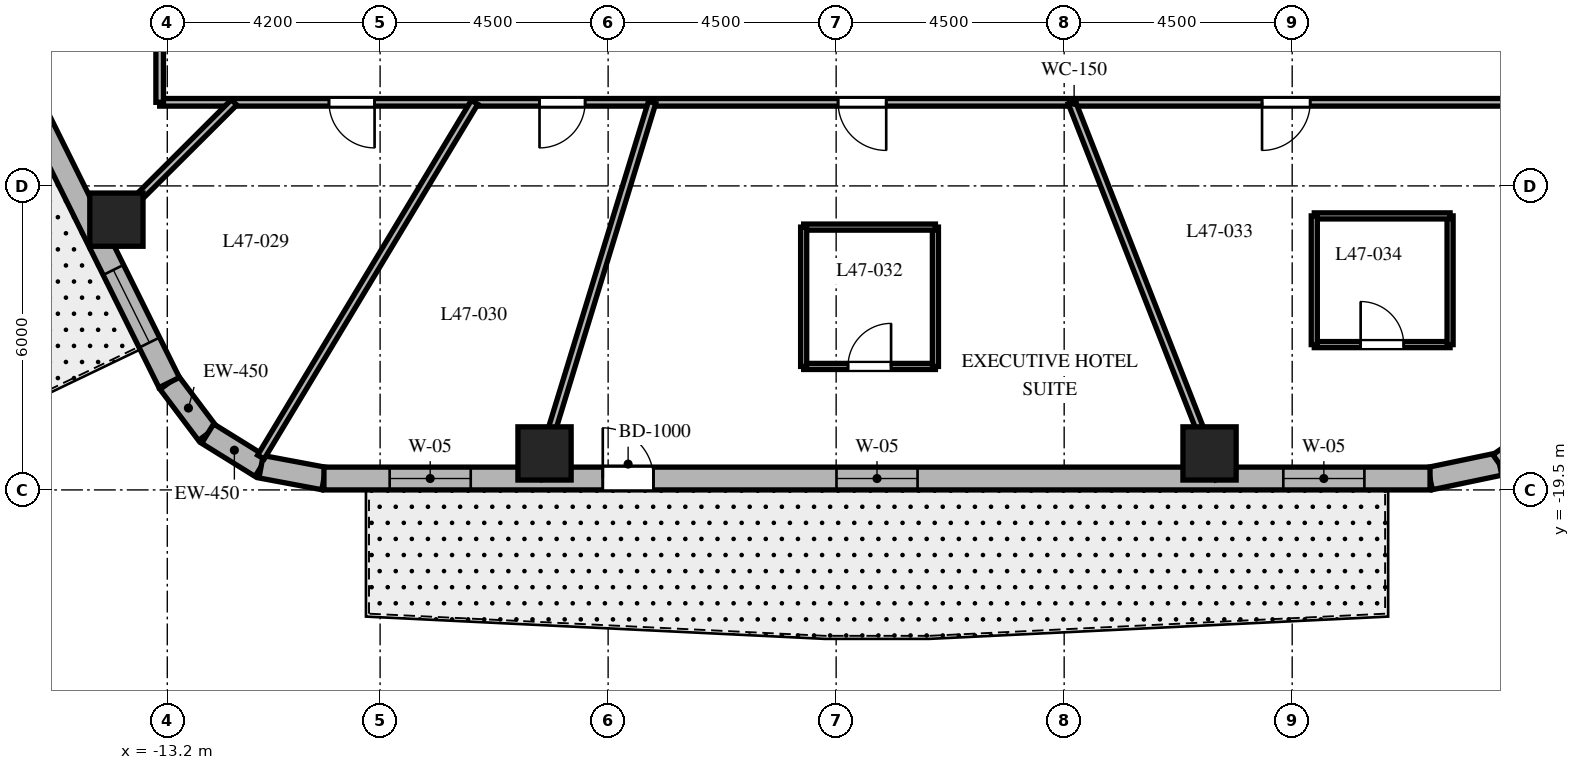
"""IFC4 building model, lengths in metres.
Left out: names, types, materials, properties, quantities, classifications, styles, units other than length and angle.
Written with IfcOpenShell. Run it as: python <this file> out.ifc"""

import sys

from ifc_helpers import new_model, si_unit, direction, frame, frame_2d, origin, origin_2d, place, context, subcontext, project, spatial, rectangle, extrude, element, fill, save


model = new_model("IFC4")
c1 = context("Model", 3, precision=1e-05, world=origin(), true_north=direction((0.0, 1.0)))
c2 = subcontext(c1, "Body", "Model", "MODEL_VIEW")
j1 = project(units=[si_unit("LENGTHUNIT", "METRE"), si_unit("PLANEANGLEUNIT", "RADIAN")], contexts=[c1])
p1 = place(None, origin())
s1 = spatial("IfcSite", under=j1, at=p1, CompositionType="ELEMENT")
p2 = place(p1, origin())
s2 = spatial("IfcBuilding", under=s1, at=p2, CompositionType="ELEMENT")
p3 = place(p2, frame((0.0, 0.0, 190.4)))
s3 = spatial("IfcBuildingStorey", under=s2, at=p3, CompositionType="ELEMENT", Elevation=190.4)
for number, where, z_axis, x_axis in (
    (1, (-5.755, -18.78, 0.0), (0.0, 0.0, 1.0), (1.0, 0.0, 0.0)),
    (2, (7.369, -18.78, 0.0), (0.0, 0.0, 1.0), (1.0, 0.0, 0.0)),
    (3, (-14.204, -14.166, 0.0), (0.0, 0.0, 1.0), (1.0, 0.0, 0.0)),
):
    element("IfcColumn", number, at=place(p3, frame(where, z_axis=z_axis, x_axis=x_axis)), inside=s3, PredefinedType="COLUMN", context=c2, shape_type="SweptSolid", body=[
        extrude(rectangle(XDim=1.05, YDim=1.05, at=origin_2d()), origin(), (0.0, 0.0, 1.0), 3.7),
    ])
p4 = place(p3, frame((-13.162, -17.381, 0.0), z_axis=(0.0, 0.0, 1.0), x_axis=(0.601515770517, -0.798860925205, 0.0)))
e4 = element("IfcWall", 4, at=p4, inside=s3, PredefinedType="SOLIDWALL", context=c2, shape_type="SweptSolid", body=[
    extrude(rectangle(XDim=1.262, YDim=0.45, at=frame_2d((0.631, 0.0))), origin(), (0.0, 0.0, 1.0), 3.4),
])
p5 = place(p3, frame((-12.403, -18.389, 0.0), z_axis=(0.0, 0.0, 1.0), x_axis=(0.849795170926, -0.527113049991, 0.0)))
e5 = element("IfcWall", 5, at=p5, inside=s3, PredefinedType="SOLIDWALL", context=c2, shape_type="SweptSolid", body=[
    extrude(rectangle(XDim=1.241, YDim=0.45, at=frame_2d((0.62, 0.0))), origin(), (0.0, 0.0, 1.0), 3.4),
])
p6 = place(p3, frame((-11.349, -19.043, 0.0), z_axis=(0.0, 0.0, 1.0), x_axis=(0.982931267051, -0.183973161772, 0.0)))
e6 = element("IfcWall", 6, at=p6, inside=s3, PredefinedType="SOLIDWALL", context=c2, shape_type="SweptSolid", body=[
    extrude(rectangle(XDim=1.262, YDim=0.45, at=frame_2d((0.631, 0.0))), origin(), (0.0, 0.0, 1.0), 3.4),
])
p7 = place(p3, frame((11.72, -19.275, 0.0), z_axis=(0.0, 0.0, 1.0), x_axis=(0.97893106758, 0.204191001093, 0.0)))
e7 = element("IfcWall", 7, at=p7, inside=s3, PredefinedType="SOLIDWALL", context=c2, shape_type="SweptSolid", body=[
    extrude(rectangle(XDim=1.4, YDim=0.45, at=frame_2d((0.7, 0.0))), origin(), (0.0, 0.0, 1.0), 3.4),
])
p8 = place(p3, frame((13.091, -18.989, 0.0), z_axis=(0.0, 0.0, 1.0), x_axis=(0.815574637848, 0.578651890258, 0.0)))
e8 = element("IfcWall", 8, at=p8, inside=s3, PredefinedType="SOLIDWALL", context=c2, shape_type="SweptSolid", body=[
    extrude(rectangle(XDim=1.377, YDim=0.45, at=frame_2d((0.688, 0.0))), origin(), (0.0, 0.0, 1.0), 3.4),
])
p9 = place(p3, frame((-10.108, -19.275, 0.0), z_axis=(0.0, 0.0, 1.0), x_axis=(1.0, 0.0, 0.0)))
e9 = element("IfcWall", 9, at=p9, inside=s3, PredefinedType="SOLIDWALL", context=c2, shape_type="SweptSolid", body=[
    extrude(rectangle(XDim=21.829, YDim=0.45, at=frame_2d((10.915, 0.0))), origin(), (0.0, 0.0, 1.0), 3.4),
])
p10 = place(p9, frame((5.503, 0.0, 0.0)))
e10 = element("IfcOpeningElement", 10, at=p10, cuts=e9, PredefinedType="OPENING", context=c2, shape_type="SweptSolid", body=[
    extrude(rectangle(XDim=1.0, YDim=2.15, at=frame_2d((0.5, 1.075))), frame((0.0, 0.235, 0.0), z_axis=(0.0, -1.0, 0.0), x_axis=(1.0, 0.0, 0.0)), (0.0, 0.0, 1.0), 0.47),
])
p11 = place(p9, frame((1.297, 0.0, 0.8)))
e11 = element("IfcOpeningElement", 11, at=p11, cuts=e9, PredefinedType="OPENING", context=c2, shape_type="SweptSolid", body=[
    extrude(rectangle(XDim=1.6, YDim=1.75, at=frame_2d((0.8, 0.875))), frame((0.0, 0.235, 0.0), z_axis=(0.0, -1.0, 0.0), x_axis=(1.0, 0.0, 0.0)), (0.0, 0.0, 1.0), 0.47),
])
p12 = place(p9, frame((10.115, 0.0, 0.8)))
e12 = element("IfcOpeningElement", 12, at=p12, cuts=e9, PredefinedType="OPENING", context=c2, shape_type="SweptSolid", body=[
    extrude(rectangle(XDim=1.6, YDim=1.75, at=frame_2d((0.8, 0.875))), frame((0.0, 0.235, 0.0), z_axis=(0.0, -1.0, 0.0), x_axis=(1.0, 0.0, 0.0)), (0.0, 0.0, 1.0), 0.47),
])
p13 = place(p9, frame((18.933, 0.0, 0.8)))
e13 = element("IfcOpeningElement", 13, at=p13, cuts=e9, PredefinedType="OPENING", context=c2, shape_type="SweptSolid", body=[
    extrude(rectangle(XDim=1.6, YDim=1.75, at=frame_2d((0.8, 0.875))), frame((0.0, 0.235, 0.0), z_axis=(0.0, -1.0, 0.0), x_axis=(1.0, 0.0, 0.0)), (0.0, 0.0, 1.0), 0.47),
])
p14 = place(p3, frame((-20.618, -2.344, 0.0), z_axis=(0.0, 0.0, 1.0), x_axis=(0.444243691097, -0.895905990002, 0.0)))
e14 = element("IfcWall", 14, at=p14, inside=s3, PredefinedType="SOLIDWALL", context=c2, shape_type="SweptSolid", body=[
    extrude(rectangle(XDim=16.784, YDim=0.45, at=frame_2d((8.392, 0.0))), origin(), (0.0, 0.0, 1.0), 3.4),
])
p15 = place(p14, frame((4.535, 0.0, 0.0)))
e15 = element("IfcOpeningElement", 15, at=p15, cuts=e14, PredefinedType="OPENING", context=c2, shape_type="SweptSolid", body=[
    extrude(rectangle(XDim=0.95, YDim=2.15, at=frame_2d((0.475, 1.075))), frame((0.0, 0.235, 0.0), z_axis=(0.0, -1.0, 0.0), x_axis=(1.0, 0.0, 0.0)), (0.0, 0.0, 1.0), 0.47),
])
p16 = place(p14, frame((0.931, 0.0, 0.8)))
e16 = element("IfcOpeningElement", 16, at=p16, cuts=e14, PredefinedType="OPENING", context=c2, shape_type="SweptSolid", body=[
    extrude(rectangle(XDim=1.6, YDim=1.75, at=frame_2d((0.8, 0.875))), frame((0.0, 0.235, 0.0), z_axis=(0.0, -1.0, 0.0), x_axis=(1.0, 0.0, 0.0)), (0.0, 0.0, 1.0), 0.47),
])
p17 = place(p14, frame((7.642, 0.0, 0.8)))
e17 = element("IfcOpeningElement", 17, at=p17, cuts=e14, PredefinedType="OPENING", context=c2, shape_type="SweptSolid", body=[
    extrude(rectangle(XDim=1.6, YDim=1.75, at=frame_2d((0.8, 0.875))), frame((0.0, 0.235, 0.0), z_axis=(0.0, -1.0, 0.0), x_axis=(1.0, 0.0, 0.0)), (0.0, 0.0, 1.0), 0.47),
])
p18 = place(p14, frame((14.303, 0.0, 0.8)))
e18 = element("IfcOpeningElement", 18, at=p18, cuts=e14, PredefinedType="OPENING", context=c2, shape_type="SweptSolid", body=[
    extrude(rectangle(XDim=1.6, YDim=1.75, at=frame_2d((0.8, 0.875))), frame((0.0, 0.235, 0.0), z_axis=(0.0, -1.0, 0.0), x_axis=(1.0, 0.0, 0.0)), (0.0, 0.0, 1.0), 0.47),
])
p19 = place(p3, frame((13.35, -11.85, 0.0), z_axis=(0.0, 0.0, 1.0), x_axis=(-1.0, 0.0, 0.0)))
e19 = element("IfcWall", 19, at=p19, inside=s3, PredefinedType="PARTITIONING", context=c2, shape_type="SweptSolid", body=[
    extrude(rectangle(XDim=26.7, YDim=0.15, at=frame_2d((13.35, 0.0))), origin(), (0.0, 0.0, 1.0), 2.84),
])
p20 = place(p19, frame((22.459, 0.0, 0.0)))
e20 = element("IfcOpeningElement", 20, at=p20, cuts=e19, PredefinedType="OPENING", context=c2, shape_type="SweptSolid", body=[
    extrude(rectangle(XDim=0.9, YDim=2.03, at=frame_2d((0.45, 1.015))), frame((0.0, 0.085, 0.0), z_axis=(0.0, -1.0, 0.0), x_axis=(1.0, 0.0, 0.0)), (0.0, 0.0, 1.0), 0.17),
])
p21 = place(p19, frame((18.304, 0.0, 0.0)))
e21 = element("IfcOpeningElement", 21, at=p21, cuts=e19, PredefinedType="OPENING", context=c2, shape_type="SweptSolid", body=[
    extrude(rectangle(XDim=0.9, YDim=2.03, at=frame_2d((0.45, 1.015))), frame((0.0, 0.085, 0.0), z_axis=(0.0, -1.0, 0.0), x_axis=(1.0, 0.0, 0.0)), (0.0, 0.0, 1.0), 0.17),
])
p22 = place(p19, frame((12.362, 0.0, 0.0)))
e22 = element("IfcOpeningElement", 22, at=p22, cuts=e19, PredefinedType="OPENING", context=c2, shape_type="SweptSolid", body=[
    extrude(rectangle(XDim=0.95, YDim=2.03, at=frame_2d((0.475, 1.015))), frame((0.0, 0.085, 0.0), z_axis=(0.0, -1.0, 0.0), x_axis=(1.0, 0.0, 0.0)), (0.0, 0.0, 1.0), 0.17),
])
p23 = place(p19, frame((3.995, 0.0, 0.0)))
e23 = element("IfcOpeningElement", 23, at=p23, cuts=e19, PredefinedType="OPENING", context=c2, shape_type="SweptSolid", body=[
    extrude(rectangle(XDim=0.95, YDim=2.03, at=frame_2d((0.475, 1.015))), frame((0.0, 0.085, 0.0), z_axis=(0.0, -1.0, 0.0), x_axis=(1.0, 0.0, 0.0)), (0.0, 0.0, 1.0), 0.17),
])
p24 = place(p3, frame((-13.35, -11.85, 0.0), z_axis=(0.0, 0.0, 1.0), x_axis=(0.0, 1.0, 0.0)))
e24 = element("IfcWall", 24, at=p24, inside=s3, PredefinedType="PARTITIONING", context=c2, shape_type="SweptSolid", body=[
    extrude(rectangle(XDim=23.7, YDim=0.15, at=frame_2d((11.85, 0.0))), origin(), (0.0, 0.0, 1.0), 2.84),
])
p25 = place(p24, frame((18.389, 0.0, 0.0)))
e25 = element("IfcOpeningElement", 25, at=p25, cuts=e24, PredefinedType="OPENING", context=c2, shape_type="SweptSolid", body=[
    extrude(rectangle(XDim=0.95, YDim=2.03, at=frame_2d((0.475, 1.015))), frame((0.0, 0.085, 0.0), z_axis=(0.0, -1.0, 0.0), x_axis=(1.0, 0.0, 0.0)), (0.0, 0.0, 1.0), 0.17),
])
p26 = place(p24, frame((10.751, 0.0, 0.0)))
e26 = element("IfcOpeningElement", 26, at=p26, cuts=e24, PredefinedType="OPENING", context=c2, shape_type="SweptSolid", body=[
    extrude(rectangle(XDim=0.95, YDim=2.03, at=frame_2d((0.475, 1.015))), frame((0.0, 0.085, 0.0), z_axis=(0.0, -1.0, 0.0), x_axis=(1.0, 0.0, 0.0)), (0.0, 0.0, 1.0), 0.17),
])
p27 = place(p24, frame((3.74, 0.0, 0.0)))
e27 = element("IfcOpeningElement", 27, at=p27, cuts=e24, PredefinedType="OPENING", context=c2, shape_type="SweptSolid", body=[
    extrude(rectangle(XDim=0.95, YDim=2.03, at=frame_2d((0.475, 1.015))), frame((0.0, 0.085, 0.0), z_axis=(0.0, -1.0, 0.0), x_axis=(1.0, 0.0, 0.0)), (0.0, 0.0, 1.0), 0.17),
])
p28 = place(p3, frame((-11.882, -11.85, 0.0), z_axis=(0.0, 0.0, 1.0), x_axis=(-0.708037373639, -0.706174962407, 0.0)))
e28 = element("IfcWall", 28, at=p28, inside=s3, PredefinedType="PARTITIONING", context=c2, shape_type="SweptSolid", body=[
    extrude(rectangle(XDim=3.802, YDim=0.15, at=frame_2d((1.901, 0.0))), origin(), (0.0, 0.0, 1.0), 2.64),
])
p29 = place(p3, frame((-7.136, -11.85, 0.0), z_axis=(0.0, 0.0, 1.0), x_axis=(-0.515900673207, -0.856648408266, 0.0)))
e29 = element("IfcWall", 29, at=p29, inside=s3, PredefinedType="PARTITIONING", context=c2, shape_type="SweptSolid", body=[
    extrude(rectangle(XDim=8.174, YDim=0.15, at=frame_2d((4.087, 0.0))), origin(), (0.0, 0.0, 1.0), 2.64),
])
p30 = place(p3, frame((-3.631, -11.85, 0.0), z_axis=(0.0, 0.0, 1.0), x_axis=(-0.293007573338, -0.956110120209, 0.0)))
e30 = element("IfcWall", 30, at=p30, inside=s3, PredefinedType="PARTITIONING", context=c2, shape_type="SweptSolid", body=[
    extrude(rectangle(XDim=7.766, YDim=0.15, at=frame_2d((3.883, 0.0))), origin(), (0.0, 0.0, 1.0), 2.64),
])
p31 = place(p3, frame((4.65, -11.85, 0.0), z_axis=(0.0, 0.0, 1.0), x_axis=(0.365265947993, -0.930903210456, 0.0)))
e31 = element("IfcWall", 31, at=p31, inside=s3, PredefinedType="PARTITIONING", context=c2, shape_type="SweptSolid", body=[
    extrude(rectangle(XDim=7.976, YDim=0.15, at=frame_2d((3.988, 0.0))), origin(), (0.0, 0.0, 1.0), 2.64),
])
p32 = place(p3, frame((-0.641, -17.063, 0.0), z_axis=(0.0, 0.0, 1.0), x_axis=(1.0, 0.0, 0.0)))
e32 = element("IfcWall", 32, at=p32, inside=s3, PredefinedType="PARTITIONING", context=c2, shape_type="SweptSolid", body=[
    extrude(rectangle(XDim=2.6, YDim=0.12, at=frame_2d((1.3, 0.0))), origin(), (0.0, 0.0, 1.0), 3.4),
])
p33 = place(p32, frame((0.875, 0.0, 0.0)))
e33 = element("IfcOpeningElement", 33, at=p33, cuts=e32, PredefinedType="OPENING", context=c2, shape_type="SweptSolid", body=[
    extrude(rectangle(XDim=0.85, YDim=2.03, at=frame_2d((0.425, 1.015))), frame((0.0, 0.07, 0.0), z_axis=(0.0, -1.0, 0.0), x_axis=(1.0, 0.0, 0.0)), (0.0, 0.0, 1.0), 0.14),
])
p34 = place(p3, frame((1.959, -17.063, 0.0), z_axis=(0.0, 0.0, 1.0), x_axis=(0.0, 1.0, 0.0)))
e34 = element("IfcWall", 34, at=p34, inside=s3, PredefinedType="PARTITIONING", context=c2, shape_type="SweptSolid", body=[
    extrude(rectangle(XDim=2.75, YDim=0.12, at=frame_2d((1.375, 0.0))), origin(), (0.0, 0.0, 1.0), 2.841),
])
p35 = place(p3, frame((1.959, -14.313, 0.0), z_axis=(0.0, 0.0, 1.0), x_axis=(-1.0, 0.0, 0.0)))
e35 = element("IfcWall", 35, at=p35, inside=s3, PredefinedType="PARTITIONING", context=c2, shape_type="SweptSolid", body=[
    extrude(rectangle(XDim=2.6, YDim=0.12, at=frame_2d((1.3, 0.0))), origin(), (0.0, 0.0, 1.0), 3.4),
])
p36 = place(p3, frame((-0.641, -14.313, 0.0), z_axis=(0.0, 0.0, 1.0), x_axis=(0.0, -1.0, 0.0)))
e36 = element("IfcWall", 36, at=p36, inside=s3, PredefinedType="PARTITIONING", context=c2, shape_type="SweptSolid", body=[
    extrude(rectangle(XDim=2.75, YDim=0.12, at=frame_2d((1.375, 0.0))), origin(), (0.0, 0.0, 1.0), 2.841),
])
p37 = place(p3, frame((9.436, -16.632, 0.0), z_axis=(0.0, 0.0, 1.0), x_axis=(1.0, 0.0, 0.0)))
e37 = element("IfcWall", 37, at=p37, inside=s3, PredefinedType="PARTITIONING", context=c2, shape_type="SweptSolid", body=[
    extrude(rectangle(XDim=2.68, YDim=0.12, at=frame_2d((1.34, 0.0))), origin(), (0.0, 0.0, 1.0), 2.64),
])
p38 = place(p37, frame((0.915, 0.0, 0.0)))
e38 = element("IfcOpeningElement", 38, at=p38, cuts=e37, PredefinedType="OPENING", context=c2, shape_type="SweptSolid", body=[
    extrude(rectangle(XDim=0.85, YDim=2.03, at=frame_2d((0.425, 1.015))), frame((0.0, 0.07, 0.0), z_axis=(0.0, -1.0, 0.0), x_axis=(1.0, 0.0, 0.0)), (0.0, 0.0, 1.0), 0.14),
])
p39 = place(p3, frame((12.116, -16.632, 0.0), z_axis=(0.0, 0.0, 1.0), x_axis=(0.0, 1.0, 0.0)))
e39 = element("IfcWall", 39, at=p39, inside=s3, PredefinedType="PARTITIONING", context=c2, shape_type="SweptSolid", body=[
    extrude(rectangle(XDim=2.54, YDim=0.12, at=frame_2d((1.27, 0.0))), origin(), (0.0, 0.0, 1.0), 2.64),
])
p40 = place(p3, frame((12.116, -14.092, 0.0), z_axis=(0.0, 0.0, 1.0), x_axis=(-1.0, 0.0, 0.0)))
e40 = element("IfcWall", 40, at=p40, inside=s3, PredefinedType="PARTITIONING", context=c2, shape_type="SweptSolid", body=[
    extrude(rectangle(XDim=2.68, YDim=0.12, at=frame_2d((1.34, 0.0))), origin(), (0.0, 0.0, 1.0), 2.927),
])
p41 = place(p3, frame((9.436, -14.092, 0.0), z_axis=(0.0, 0.0, 1.0), x_axis=(0.0, -1.0, 0.0)))
e41 = element("IfcWall", 41, at=p41, inside=s3, PredefinedType="PARTITIONING", context=c2, shape_type="SweptSolid", body=[
    extrude(rectangle(XDim=2.54, YDim=0.12, at=frame_2d((1.27, 0.0))), origin(), (0.0, 0.0, 1.0), 2.927),
])
p42 = place(p10, origin())
e42 = element("IfcDoor", 42, at=p42, inside=s3, OperationType="SINGLE_SWING_LEFT", PredefinedType="DOOR", context=c2, shape_type="SweptSolid", body=[
    extrude(rectangle(XDim=1.0, YDim=2.15, at=frame_2d((0.5, 1.075))), frame((0.0, 0.025, 0.0), z_axis=(0.0, -1.0, 0.0), x_axis=(1.0, 0.0, 0.0)), (0.0, 0.0, 1.0), 0.05),
])
fill(e10, e42)
p43 = place(p11, origin())
e43 = element("IfcWindow", 43, at=p43, inside=s3, PartitioningType="SINGLE_PANEL", PredefinedType="WINDOW", context=c2, shape_type="SweptSolid", body=[
    extrude(rectangle(XDim=1.6, YDim=1.75, at=frame_2d((0.8, 0.875))), frame((0.0, 0.03, 0.0), z_axis=(0.0, -1.0, 0.0), x_axis=(1.0, 0.0, 0.0)), (0.0, 0.0, 1.0), 0.06),
])
fill(e11, e43)
p44 = place(p12, origin())
e44 = element("IfcWindow", 44, at=p44, inside=s3, PartitioningType="SINGLE_PANEL", PredefinedType="WINDOW", context=c2, shape_type="SweptSolid", body=[
    extrude(rectangle(XDim=1.6, YDim=1.75, at=frame_2d((0.8, 0.875))), frame((0.0, 0.03, 0.0), z_axis=(0.0, -1.0, 0.0), x_axis=(1.0, 0.0, 0.0)), (0.0, 0.0, 1.0), 0.06),
])
fill(e12, e44)
p45 = place(p13, origin())
e45 = element("IfcWindow", 45, at=p45, inside=s3, PartitioningType="SINGLE_PANEL", PredefinedType="WINDOW", context=c2, shape_type="SweptSolid", body=[
    extrude(rectangle(XDim=1.6, YDim=1.75, at=frame_2d((0.8, 0.875))), frame((0.0, 0.03, 0.0), z_axis=(0.0, -1.0, 0.0), x_axis=(1.0, 0.0, 0.0)), (0.0, 0.0, 1.0), 0.06),
])
fill(e13, e45)
p46 = place(p18, origin())
e46 = element("IfcWindow", 46, at=p46, inside=s3, PartitioningType="SINGLE_PANEL", PredefinedType="WINDOW", context=c2, shape_type="SweptSolid", body=[
    extrude(rectangle(XDim=1.6, YDim=1.75, at=frame_2d((0.8, 0.875))), frame((0.0, 0.03, 0.0), z_axis=(0.0, -1.0, 0.0), x_axis=(1.0, 0.0, 0.0)), (0.0, 0.0, 1.0), 0.06),
])
fill(e18, e46)
p47 = place(p20, origin())
e47 = element("IfcDoor", 47, at=p47, inside=s3, OperationType="SINGLE_SWING_LEFT", PredefinedType="DOOR", context=c2, shape_type="SweptSolid", body=[
    extrude(rectangle(XDim=0.9, YDim=2.03, at=frame_2d((0.45, 1.015))), frame((0.0, 0.025, 0.0), z_axis=(0.0, -1.0, 0.0), x_axis=(1.0, 0.0, 0.0)), (0.0, 0.0, 1.0), 0.05),
])
fill(e20, e47)
p48 = place(p21, origin())
e48 = element("IfcDoor", 48, at=p48, inside=s3, OperationType="SINGLE_SWING_RIGHT", PredefinedType="DOOR", context=c2, shape_type="SweptSolid", body=[
    extrude(rectangle(XDim=0.9, YDim=2.03, at=frame_2d((0.45, 1.015))), frame((0.0, 0.025, 0.0), z_axis=(0.0, -1.0, 0.0), x_axis=(1.0, 0.0, 0.0)), (0.0, 0.0, 1.0), 0.05),
])
fill(e21, e48)
p49 = place(p22, origin())
e49 = element("IfcDoor", 49, at=p49, inside=s3, OperationType="SINGLE_SWING_LEFT", PredefinedType="DOOR", context=c2, shape_type="SweptSolid", body=[
    extrude(rectangle(XDim=0.95, YDim=2.03, at=frame_2d((0.475, 1.015))), frame((0.0, 0.025, 0.0), z_axis=(0.0, -1.0, 0.0), x_axis=(1.0, 0.0, 0.0)), (0.0, 0.0, 1.0), 0.05),
])
fill(e22, e49)
p50 = place(p33, origin())
e50 = element("IfcDoor", 50, at=p50, inside=s3, OperationType="SINGLE_SWING_RIGHT", PredefinedType="DOOR", context=c2, shape_type="SweptSolid", body=[
    extrude(rectangle(XDim=0.85, YDim=2.03, at=frame_2d((0.425, 1.015))), frame((0.0, 0.025, 0.0), z_axis=(0.0, -1.0, 0.0), x_axis=(1.0, 0.0, 0.0)), (0.0, 0.0, 1.0), 0.05),
])
fill(e33, e50)
p51 = place(p23, origin())
e51 = element("IfcDoor", 51, at=p51, inside=s3, OperationType="SINGLE_SWING_RIGHT", PredefinedType="DOOR", context=c2, shape_type="SweptSolid", body=[
    extrude(rectangle(XDim=0.95, YDim=2.03, at=frame_2d((0.475, 1.015))), frame((0.0, 0.025, 0.0), z_axis=(0.0, -1.0, 0.0), x_axis=(1.0, 0.0, 0.0)), (0.0, 0.0, 1.0), 0.05),
])
fill(e23, e51)
p52 = place(p38, origin())
e52 = element("IfcDoor", 52, at=p52, inside=s3, OperationType="SINGLE_SWING_LEFT", PredefinedType="DOOR", context=c2, shape_type="SweptSolid", body=[
    extrude(rectangle(XDim=0.85, YDim=2.03, at=frame_2d((0.425, 1.015))), frame((0.0, 0.025, 0.0), z_axis=(0.0, -1.0, 0.0), x_axis=(1.0, 0.0, 0.0)), (0.0, 0.0, 1.0), 0.05),
])
fill(e38, e52)
save(model, sys.argv[1])
